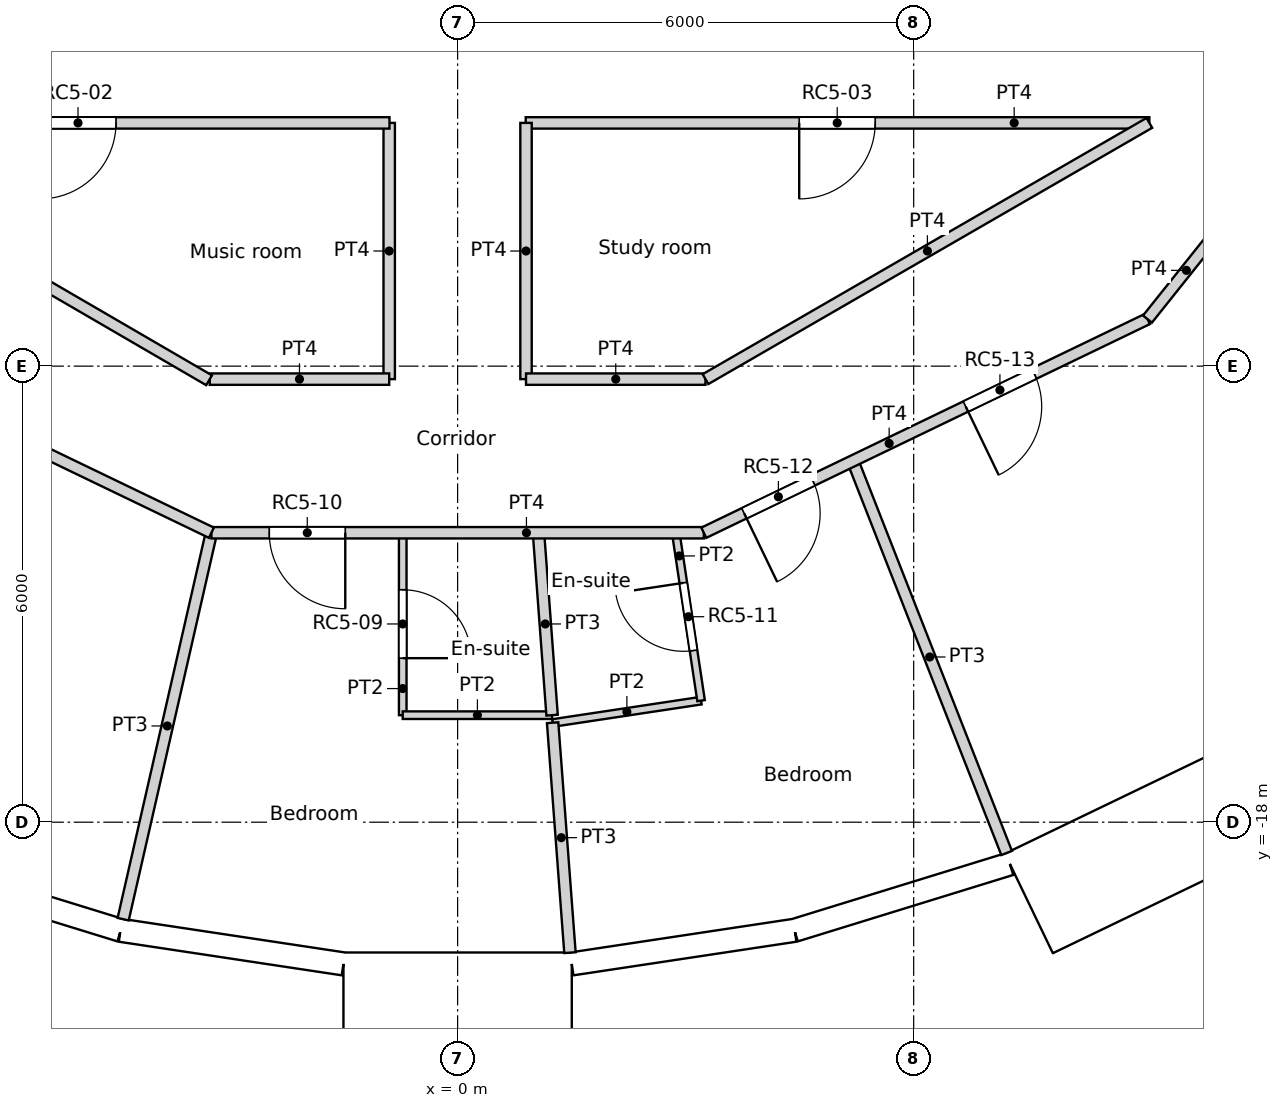
"""IFC4 building model, lengths in metres.
Left out: names, types, materials, properties, quantities, classifications, styles, units other than length and angle.
Written with IfcOpenShell. Run it as: python <this file> out.ifc"""

import sys

from ifc_helpers import new_model, si_unit, direction, frame, frame_2d, origin, origin_2d, place, context, subcontext, project, spatial, rectangle, circle, extrude, element, fill, save


model = new_model("IFC4")
c1 = context("Model", 3, precision=1e-05, world=origin(), true_north=direction((0.0, 1.0)))
c2 = subcontext(c1, "Body", "Model", "MODEL_VIEW")
j1 = project(units=[si_unit("LENGTHUNIT", "METRE"), si_unit("PLANEANGLEUNIT", "RADIAN")], contexts=[c1])
p1 = place(None, origin())
s1 = spatial("IfcSite", under=j1, at=p1, CompositionType="ELEMENT")
p2 = place(p1, origin())
s2 = spatial("IfcBuilding", under=s1, at=p2, CompositionType="ELEMENT")
p3 = place(p2, frame((0.0, 0.0, 270.6)))
s3 = spatial("IfcBuildingStorey", under=s2, at=p3, CompositionType="ELEMENT", Elevation=270.6)
for number, where, z_axis, x_axis in (
    (1, (-4.188, -18.35, 0.0), (0.0, 0.0, 1.0), (1.0, 0.0, 0.0)),
    (2, (1.406, -18.77, 0.0), (0.0, 0.0, 1.0), (1.0, 0.0, 0.0)),
    (3, (6.876, -17.521, 0.0), (0.0, 0.0, 1.0), (1.0, 0.0, 0.0)),
):
    element("IfcColumn", number, at=place(p3, frame(where, z_axis=z_axis, x_axis=x_axis)), inside=s3, PredefinedType="COLUMN", context=c2, shape_type="SweptSolid", body=[
        extrude(circle(Radius=0.55, at=origin_2d()), origin(), (0.0, 0.0, 1.0), 3.6),
    ])
p4 = place(p3, frame((-7.264, -18.549, 0.0), z_axis=(0.0, 0.0, 1.0), x_axis=(0.955555982805, -0.29480970765, 0.0)))
e4 = element("IfcWall", 4, at=p4, inside=s3, PredefinedType="SOLIDWALL", context=c2, shape_type="SweptSolid", body=[
    extrude(rectangle(XDim=2.962, YDim=0.3, at=frame_2d((1.481, 0.0))), origin(), (0.0, 0.0, 1.0), 3.25),
])
p5 = place(p4, frame((1.481, 0.0, 1.55)))
e5 = element("IfcOpeningElement", 5, at=p5, cuts=e4, PredefinedType="OPENING", context=c2, shape_type="SweptSolid", body=[
    extrude(circle(Radius=0.9, at=origin_2d()), frame((0.0, 0.16, 0.0), z_axis=(0.0, -1.0, 0.0), x_axis=(1.0, 0.0, 0.0)), (0.0, 0.0, 1.0), 0.32),
])
p6 = place(p3, frame((-4.433, -19.422, 0.0), z_axis=(0.0, 0.0, 1.0), x_axis=(0.988835775663, -0.149009425104, 0.0)))
e6 = element("IfcWall", 6, at=p6, inside=s3, PredefinedType="SOLIDWALL", context=c2, shape_type="SweptSolid", body=[
    extrude(rectangle(XDim=2.962, YDim=0.3, at=frame_2d((1.481, 0.0))), origin(), (0.0, 0.0, 1.0), 3.25),
])
p7 = place(p6, frame((1.481, 0.0, 1.55)))
e7 = element("IfcOpeningElement", 7, at=p7, cuts=e6, PredefinedType="OPENING", context=c2, shape_type="SweptSolid", body=[
    extrude(circle(Radius=0.9, at=origin_2d()), frame((0.0, 0.16, 0.0), z_axis=(0.0, -1.0, 0.0), x_axis=(1.0, 0.0, 0.0)), (0.0, 0.0, 1.0), 0.32),
])
p8 = place(p3, frame((-1.5, -20.441, -0.35), z_axis=(0.0, 0.0, 1.0), x_axis=(1.0, 0.0, 0.0)))
e8 = element("IfcWall", 8, at=p8, inside=s3, PredefinedType="ELEMENTEDWALL", context=c2, shape_type="SweptSolid", body=[
    extrude(rectangle(XDim=3.0, YDim=1.45, at=frame_2d((1.5, 0.0))), origin(), (0.0, 0.0, 1.0), 3.6),
])
p9 = place(p8, frame((1.5, 0.0, 1.9)))
e9 = element("IfcOpeningElement", 9, at=p9, cuts=e8, PredefinedType="OPENING", context=c2, shape_type="SweptSolid", body=[
    extrude(circle(Radius=0.9, at=origin_2d()), frame((0.0, 0.735, 0.0), z_axis=(0.0, -1.0, 0.0), x_axis=(1.0, 0.0, 0.0)), (0.0, 0.0, 1.0), 1.47),
])
p10 = place(p3, frame((1.504, -19.864, 0.0), z_axis=(0.0, 0.0, 1.0), x_axis=(0.988835775663, 0.149009425104, 0.0)))
e10 = element("IfcWall", 10, at=p10, inside=s3, PredefinedType="SOLIDWALL", context=c2, shape_type="SweptSolid", body=[
    extrude(rectangle(XDim=2.962, YDim=0.3, at=frame_2d((1.481, 0.0))), origin(), (0.0, 0.0, 1.0), 3.25),
])
p11 = place(p10, frame((1.481, 0.0, 1.55)))
e11 = element("IfcOpeningElement", 11, at=p11, cuts=e10, PredefinedType="OPENING", context=c2, shape_type="SweptSolid", body=[
    extrude(circle(Radius=0.9, at=origin_2d()), frame((0.0, 0.16, 0.0), z_axis=(0.0, -1.0, 0.0), x_axis=(1.0, 0.0, 0.0)), (0.0, 0.0, 1.0), 0.32),
])
p12 = place(p3, frame((4.433, -19.422, 0.0), z_axis=(0.0, 0.0, 1.0), x_axis=(0.955555982805, 0.29480970765, 0.0)))
e12 = element("IfcWall", 12, at=p12, inside=s3, PredefinedType="SOLIDWALL", context=c2, shape_type="SweptSolid", body=[
    extrude(rectangle(XDim=2.962, YDim=0.3, at=frame_2d((1.481, 0.0))), origin(), (0.0, 0.0, 1.0), 3.25),
])
p13 = place(p12, frame((1.481, 0.0, 1.55)))
e13 = element("IfcOpeningElement", 13, at=p13, cuts=e12, PredefinedType="OPENING", context=c2, shape_type="SweptSolid", body=[
    extrude(circle(Radius=0.9, at=origin_2d()), frame((0.0, 0.16, 0.0), z_axis=(0.0, -1.0, 0.0), x_axis=(1.0, 0.0, 0.0)), (0.0, 0.0, 1.0), 0.32),
])
p14 = place(p3, frame((7.518, -19.068, -0.35), z_axis=(0.0, 0.0, 1.0), x_axis=(0.900953362039, 0.433915935904, 0.0)))
e14 = element("IfcWall", 14, at=p14, inside=s3, PredefinedType="ELEMENTEDWALL", context=c2, shape_type="SweptSolid", body=[
    extrude(rectangle(XDim=3.0, YDim=1.45, at=frame_2d((1.5, 0.0))), origin(), (0.0, 0.0, 1.0), 3.6),
])
p15 = place(p14, frame((1.5, 0.0, 1.9)))
e15 = element("IfcOpeningElement", 15, at=p15, cuts=e14, PredefinedType="OPENING", context=c2, shape_type="SweptSolid", body=[
    extrude(circle(Radius=0.9, at=origin_2d()), frame((0.0, 0.735, 0.0), z_axis=(0.0, -1.0, 0.0), x_axis=(1.0, 0.0, 0.0)), (0.0, 0.0, 1.0), 1.47),
])
p16 = place(p3, frame((-9.092, -8.8, 0.0), z_axis=(0.0, 0.0, 1.0), x_axis=(1.0, 0.0, 0.0)))
e16 = element("IfcWall", 16, at=p16, inside=s3, PredefinedType="PARTITIONING", context=c2, shape_type="SweptSolid", body=[
    extrude(rectangle(XDim=8.196, YDim=0.15, at=frame_2d((4.098, 0.0))), origin(), (0.0, 0.0, 1.0), 3.1),
])
p17 = place(p16, frame((3.598, 0.0, 0.0)))
e17 = element("IfcOpeningElement", 17, at=p17, cuts=e16, PredefinedType="OPENING", context=c2, shape_type="SweptSolid", body=[
    extrude(rectangle(XDim=1.0, YDim=2.04, at=frame_2d((0.5, 1.02))), frame((0.0, 0.075, 0.0), z_axis=(0.0, -1.0, 0.0), x_axis=(1.0, 0.0, 0.0)), (0.0, 0.0, 1.0), 0.15),
])
p18 = place(p3, frame((-9.092, -8.8, 0.0), z_axis=(0.0, 0.0, 1.0), x_axis=(0.864470922103, -0.502682827277, 0.0)))
e18 = element("IfcWall", 18, at=p18, inside=s3, PredefinedType="PARTITIONING", context=c2, shape_type="SweptSolid", body=[
    extrude(rectangle(XDim=6.735, YDim=0.15, at=frame_2d((3.368, 0.0))), origin(), (0.0, 0.0, 1.0), 3.1),
])
p19 = place(p3, frame((0.896, -8.8, 0.0), z_axis=(0.0, 0.0, 1.0), x_axis=(1.0, 0.0, 0.0)))
e19 = element("IfcWall", 19, at=p19, inside=s3, PredefinedType="PARTITIONING", context=c2, shape_type="SweptSolid", body=[
    extrude(rectangle(XDim=8.205, YDim=0.15, at=frame_2d((4.102, 0.0))), origin(), (0.0, 0.0, 1.0), 3.1),
])
p20 = place(p19, frame((3.598, 0.0, 0.0)))
e20 = element("IfcOpeningElement", 20, at=p20, cuts=e19, PredefinedType="OPENING", context=c2, shape_type="SweptSolid", body=[
    extrude(rectangle(XDim=1.0, YDim=2.04, at=frame_2d((0.5, 1.02))), frame((0.0, 0.075, 0.0), z_axis=(0.0, -1.0, 0.0), x_axis=(1.0, 0.0, 0.0)), (0.0, 0.0, 1.0), 0.15),
])
p21 = place(p3, frame((-3.261, -12.171, 0.0), z_axis=(0.0, 0.0, 1.0), x_axis=(1.0, 0.0, 0.0)))
e21 = element("IfcWall", 21, at=p21, inside=s3, PredefinedType="PARTITIONING", context=c2, shape_type="SweptSolid", body=[
    extrude(rectangle(XDim=2.361, YDim=0.15, at=frame_2d((1.181, 0.0))), origin(), (0.0, 0.0, 1.0), 3.1),
])
for number, where, z_axis, x_axis in (
    (22, (-0.9, -12.171, 0.0), (0.0, 0.0, 1.0), (0.0, 1.0, 0.0)),
    (23, (0.9, -12.171, 0.0), (0.0, 0.0, 1.0), (0.0, 1.0, 0.0)),
):
    element("IfcWall", number, at=place(p3, frame(where, z_axis=z_axis, x_axis=x_axis)), inside=s3, PredefinedType="PARTITIONING", context=c2, shape_type="SweptSolid", body=[
        extrude(rectangle(XDim=3.371, YDim=0.15, at=frame_2d((1.686, 0.0))), origin(), (0.0, 0.0, 1.0), 3.1),
    ])
p22 = place(p3, frame((0.9, -12.171, 0.0), z_axis=(0.0, 0.0, 1.0), x_axis=(1.0, 0.0, 0.0)))
e24 = element("IfcWall", 24, at=p22, inside=s3, PredefinedType="PARTITIONING", context=c2, shape_type="SweptSolid", body=[
    extrude(rectangle(XDim=2.361, YDim=0.15, at=frame_2d((1.181, 0.0))), origin(), (0.0, 0.0, 1.0), 3.1),
])
p23 = place(p3, frame((3.261, -12.171, 0.0), z_axis=(0.0, 0.0, 1.0), x_axis=(0.866066809554, 0.499928276245, 0.0)))
e25 = element("IfcWall", 25, at=p23, inside=s3, PredefinedType="PARTITIONING", context=c2, shape_type="SweptSolid", body=[
    extrude(rectangle(XDim=6.743, YDim=0.15, at=frame_2d((3.371, 0.0))), origin(), (0.0, 0.0, 1.0), 3.1),
])
p24 = place(p3, frame((-9.076, -11.381, 0.0), z_axis=(0.0, 0.0, 1.0), x_axis=(0.900976027191, -0.433868872388, 0.0)))
e26 = element("IfcWall", 26, at=p24, inside=s3, PredefinedType="PARTITIONING", context=c2, shape_type="SweptSolid", body=[
    extrude(rectangle(XDim=6.479, YDim=0.15, at=frame_2d((3.239, 0.0))), origin(), (0.0, 0.0, 1.0), 3.1),
])
p25 = place(p24, frame((2.74, 0.0, 0.0)))
e27 = element("IfcOpeningElement", 27, at=p25, cuts=e26, PredefinedType="OPENING", context=c2, shape_type="SweptSolid", body=[
    extrude(rectangle(XDim=1.0, YDim=2.04, at=frame_2d((0.5, 1.02))), frame((0.0, 0.075, 0.0), z_axis=(0.0, -1.0, 0.0), x_axis=(1.0, 0.0, 0.0)), (0.0, 0.0, 1.0), 0.15),
])
p26 = place(p3, frame((-3.239, -14.192, 0.0), z_axis=(0.0, 0.0, 1.0), x_axis=(1.0, 0.0, 0.0)))
e28 = element("IfcWall", 28, at=p26, inside=s3, PredefinedType="PARTITIONING", context=c2, shape_type="SweptSolid", body=[
    extrude(rectangle(XDim=6.478, YDim=0.15, at=frame_2d((3.239, 0.0))), origin(), (0.0, 0.0, 1.0), 3.1),
])
p27 = place(p26, frame((0.761, 0.0, 0.0)))
e29 = element("IfcOpeningElement", 29, at=p27, cuts=e28, PredefinedType="OPENING", context=c2, shape_type="SweptSolid", body=[
    extrude(rectangle(XDim=1.0, YDim=2.1, at=frame_2d((0.5, 1.05))), frame((0.0, 0.075, 0.0), z_axis=(0.0, -1.0, 0.0), x_axis=(1.0, 0.0, 0.0)), (0.0, 0.0, 1.0), 0.15),
])
p28 = place(p3, frame((3.239, -14.192, 0.0), z_axis=(0.0, 0.0, 1.0), x_axis=(0.900851590682, 0.434127183629, 0.0)))
e30 = element("IfcWall", 30, at=p28, inside=s3, PredefinedType="PARTITIONING", context=c2, shape_type="SweptSolid", body=[
    extrude(rectangle(XDim=6.479, YDim=0.15, at=frame_2d((3.239, 0.0))), origin(), (0.0, 0.0, 1.0), 3.1),
])
p29 = place(p28, frame((0.589, 0.0, 0.0)))
e31 = element("IfcOpeningElement", 31, at=p29, cuts=e30, PredefinedType="OPENING", context=c2, shape_type="SweptSolid", body=[
    extrude(rectangle(XDim=1.0, YDim=2.1, at=frame_2d((0.5, 1.05))), frame((0.0, 0.075, 0.0), z_axis=(0.0, -1.0, 0.0), x_axis=(1.0, 0.0, 0.0)), (0.0, 0.0, 1.0), 0.15),
])
p30 = place(p28, frame((3.825, 0.0, 0.0)))
e32 = element("IfcOpeningElement", 32, at=p30, cuts=e30, PredefinedType="OPENING", context=c2, shape_type="SweptSolid", body=[
    extrude(rectangle(XDim=1.0, YDim=2.04, at=frame_2d((0.5, 1.02))), frame((0.0, 0.075, 0.0), z_axis=(0.0, -1.0, 0.0), x_axis=(1.0, 0.0, 0.0)), (0.0, 0.0, 1.0), 0.15),
])
p31 = place(p3, frame((9.076, -11.381, 0.0), z_axis=(0.0, 0.0, 1.0), x_axis=(0.623805208652, 0.781579849829, 0.0)))
e33 = element("IfcWall", 33, at=p31, inside=s3, PredefinedType="PARTITIONING", context=c2, shape_type="SweptSolid", body=[
    extrude(rectangle(XDim=1.64, YDim=0.15, at=frame_2d((0.82, 0.0))), origin(), (0.0, 0.0, 1.0), 3.1),
])
p32 = place(p3, frame((-4.4, -19.276, 0.0), z_axis=(0.0, 0.0, 1.0), x_axis=(0.222612505682, 0.974907007008, 0.0)))
e34 = element("IfcWall", 34, at=p32, inside=s3, PredefinedType="PARTITIONING", context=c2, shape_type="SweptSolid", body=[
    extrude(rectangle(XDim=5.215, YDim=0.15, at=frame_2d((2.607, 0.0))), origin(), (0.0, 0.0, 1.0), 3.1),
])
p33 = place(p3, frame((-0.722, -16.592, 0.0), z_axis=(0.0, 0.0, 1.0), x_axis=(0.0, 1.0, 0.0)))
e35 = element("IfcWall", 35, at=p33, inside=s3, PredefinedType="PARTITIONING", context=c2, shape_type="SweptSolid", body=[
    extrude(rectangle(XDim=2.4, YDim=0.1, at=frame_2d((1.2, 0.0))), origin(), (0.0, 0.0, 1.0), 3.1),
])
p34 = place(p33, frame((0.75, 0.0, 0.0)))
e36 = element("IfcOpeningElement", 36, at=p34, cuts=e35, PredefinedType="OPENING", context=c2, shape_type="SweptSolid", body=[
    extrude(rectangle(XDim=0.9, YDim=2.04, at=frame_2d((0.45, 1.02))), frame((0.0, 0.05, 0.0), z_axis=(0.0, -1.0, 0.0), x_axis=(1.0, 0.0, 0.0)), (0.0, 0.0, 1.0), 0.1),
])
p35 = place(p3, frame((-0.722, -16.592, 0.0), z_axis=(0.0, 0.0, 1.0), x_axis=(1.0, 0.0, 0.0)))
e37 = element("IfcWall", 37, at=p35, inside=s3, PredefinedType="PARTITIONING", context=c2, shape_type="SweptSolid", body=[
    extrude(rectangle(XDim=1.965, YDim=0.1, at=frame_2d((0.982, 0.0))), origin(), (0.0, 0.0, 1.0), 3.1),
])
p36 = place(p3, frame((1.25, -16.691, 0.0), z_axis=(0.0, 0.0, 1.0), x_axis=(0.075164061246, -0.99717118084, 0.0)))
e38 = element("IfcWall", 38, at=p36, inside=s3, PredefinedType="PARTITIONING", context=c2, shape_type="SweptSolid", body=[
    extrude(rectangle(XDim=3.034, YDim=0.15, at=frame_2d((1.517, 0.0))), origin(), (0.0, 0.0, 1.0), 3.1),
])
p37 = place(p3, frame((1.064, -14.192, 0.0), z_axis=(0.0, 0.0, 1.0), x_axis=(0.074353677934, -0.997231934195, 0.0)))
e39 = element("IfcWall", 39, at=p37, inside=s3, PredefinedType="PARTITIONING", context=c2, shape_type="SweptSolid", body=[
    extrude(rectangle(XDim=2.407, YDim=0.15, at=frame_2d((1.203, 0.0))), origin(), (0.0, 0.0, 1.0), 3.1),
])
p38 = place(p3, frame((1.251, -16.695, 0.0), z_axis=(0.0, 0.0, 1.0), x_axis=(0.988831780565, 0.149035934407, 0.0)))
e40 = element("IfcWall", 40, at=p38, inside=s3, PredefinedType="PARTITIONING", context=c2, shape_type="SweptSolid", body=[
    extrude(rectangle(XDim=1.974, YDim=0.1, at=frame_2d((0.987, 0.0))), origin(), (0.0, 0.0, 1.0), 3.1),
])
p39 = place(p3, frame((2.87, -14.192, 0.0), z_axis=(0.0, 0.0, 1.0), x_axis=(0.148960349288, -0.988843169739, 0.0)))
e41 = element("IfcWall", 41, at=p39, inside=s3, PredefinedType="PARTITIONING", context=c2, shape_type="SweptSolid", body=[
    extrude(rectangle(XDim=2.234, YDim=0.1, at=frame_2d((1.117, 0.0))), origin(), (0.0, 0.0, 1.0), 3.1),
])
p40 = place(p39, frame((0.667, 0.0, 0.0)))
e42 = element("IfcOpeningElement", 42, at=p40, cuts=e41, PredefinedType="OPENING", context=c2, shape_type="SweptSolid", body=[
    extrude(rectangle(XDim=0.9, YDim=2.04, at=frame_2d((0.45, 1.02))), frame((0.0, 0.05, 0.0), z_axis=(0.0, -1.0, 0.0), x_axis=(1.0, 0.0, 0.0)), (0.0, 0.0, 1.0), 0.1),
])
p41 = place(p3, frame((5.199, -13.248, 0.0), z_axis=(0.0, 0.0, 1.0), x_axis=(0.365334662456, -0.930876245485, 0.0)))
e43 = element("IfcWall", 43, at=p41, inside=s3, PredefinedType="PARTITIONING", context=c2, shape_type="SweptSolid", body=[
    extrude(rectangle(XDim=5.54, YDim=0.15, at=frame_2d((2.77, 0.0))), origin(), (0.0, 0.0, 1.0), 3.1),
])
p42 = place(p5, origin())
e44 = element("IfcWindow", 44, at=p42, inside=s3, PartitioningType="SINGLE_PANEL", PredefinedType="WINDOW", context=c2, shape_type="SweptSolid", body=[
    extrude(circle(Radius=0.9, at=origin_2d()), frame((0.0, 0.12, 0.0), z_axis=(0.0, -1.0, 0.0), x_axis=(1.0, 0.0, 0.0)), (0.0, 0.0, 1.0), 0.1),
])
fill(e5, e44)
p43 = place(p7, origin())
e45 = element("IfcWindow", 45, at=p43, inside=s3, PartitioningType="SINGLE_PANEL", PredefinedType="WINDOW", context=c2, shape_type="SweptSolid", body=[
    extrude(circle(Radius=0.9, at=origin_2d()), frame((0.0, 0.12, 0.0), z_axis=(0.0, -1.0, 0.0), x_axis=(1.0, 0.0, 0.0)), (0.0, 0.0, 1.0), 0.1),
])
fill(e7, e45)
p44 = place(p9, origin())
e46 = element("IfcWindow", 46, at=p44, inside=s3, PartitioningType="SINGLE_PANEL", PredefinedType="WINDOW", context=c2, shape_type="SweptSolid", body=[
    extrude(circle(Radius=0.9, at=origin_2d()), frame((0.0, 0.695, 0.0), z_axis=(0.0, -1.0, 0.0), x_axis=(1.0, 0.0, 0.0)), (0.0, 0.0, 1.0), 0.1),
])
fill(e9, e46)
p45 = place(p11, origin())
e47 = element("IfcWindow", 47, at=p45, inside=s3, PartitioningType="SINGLE_PANEL", PredefinedType="WINDOW", context=c2, shape_type="SweptSolid", body=[
    extrude(circle(Radius=0.9, at=origin_2d()), frame((0.0, 0.12, 0.0), z_axis=(0.0, -1.0, 0.0), x_axis=(1.0, 0.0, 0.0)), (0.0, 0.0, 1.0), 0.1),
])
fill(e11, e47)
p46 = place(p13, origin())
e48 = element("IfcWindow", 48, at=p46, inside=s3, PartitioningType="SINGLE_PANEL", PredefinedType="WINDOW", context=c2, shape_type="SweptSolid", body=[
    extrude(circle(Radius=0.9, at=origin_2d()), frame((0.0, 0.12, 0.0), z_axis=(0.0, -1.0, 0.0), x_axis=(1.0, 0.0, 0.0)), (0.0, 0.0, 1.0), 0.1),
])
fill(e13, e48)
p47 = place(p15, origin())
e49 = element("IfcWindow", 49, at=p47, inside=s3, PartitioningType="SINGLE_PANEL", PredefinedType="WINDOW", context=c2, shape_type="SweptSolid", body=[
    extrude(circle(Radius=0.9, at=origin_2d()), frame((0.0, 0.695, 0.0), z_axis=(0.0, -1.0, 0.0), x_axis=(1.0, 0.0, 0.0)), (0.0, 0.0, 1.0), 0.1),
])
fill(e15, e49)
p48 = place(p17, origin())
e50 = element("IfcDoor", 50, at=p48, inside=s3, OperationType="SINGLE_SWING_RIGHT", PredefinedType="DOOR", context=c2, shape_type="SweptSolid", body=[
    extrude(rectangle(XDim=1.0, YDim=2.04, at=frame_2d((0.5, 1.02))), frame((0.0, 0.025, 0.0), z_axis=(0.0, -1.0, 0.0), x_axis=(1.0, 0.0, 0.0)), (0.0, 0.0, 1.0), 0.05),
])
fill(e17, e50)
p49 = place(p20, origin())
e51 = element("IfcDoor", 51, at=p49, inside=s3, OperationType="SINGLE_SWING_RIGHT", PredefinedType="DOOR", context=c2, shape_type="SweptSolid", body=[
    extrude(rectangle(XDim=1.0, YDim=2.04, at=frame_2d((0.5, 1.02))), frame((0.0, 0.025, 0.0), z_axis=(0.0, -1.0, 0.0), x_axis=(1.0, 0.0, 0.0)), (0.0, 0.0, 1.0), 0.05),
])
fill(e20, e51)
p50 = place(p34, origin())
e52 = element("IfcDoor", 52, at=p50, inside=s3, OperationType="SINGLE_SWING_RIGHT", PredefinedType="DOOR", context=c2, shape_type="SweptSolid", body=[
    extrude(rectangle(XDim=0.9, YDim=2.04, at=frame_2d((0.45, 1.02))), frame((0.0, 0.025, 0.0), z_axis=(0.0, -1.0, 0.0), x_axis=(1.0, 0.0, 0.0)), (0.0, 0.0, 1.0), 0.05),
])
fill(e36, e52)
p51 = place(p27, origin())
e53 = element("IfcDoor", 53, at=p51, inside=s3, OperationType="SINGLE_SWING_LEFT", PredefinedType="DOOR", context=c2, shape_type="SweptSolid", body=[
    extrude(rectangle(XDim=1.0, YDim=2.1, at=frame_2d((0.5, 1.05))), frame((0.0, 0.025, 0.0), z_axis=(0.0, -1.0, 0.0), x_axis=(1.0, 0.0, 0.0)), (0.0, 0.0, 1.0), 0.05),
])
fill(e29, e53)
p52 = place(p40, origin())
e54 = element("IfcDoor", 54, at=p52, inside=s3, OperationType="SINGLE_SWING_RIGHT", PredefinedType="DOOR", context=c2, shape_type="SweptSolid", body=[
    extrude(rectangle(XDim=0.9, YDim=2.04, at=frame_2d((0.45, 1.02))), frame((0.0, 0.025, 0.0), z_axis=(0.0, -1.0, 0.0), x_axis=(1.0, 0.0, 0.0)), (0.0, 0.0, 1.0), 0.05),
])
fill(e42, e54)
p53 = place(p29, origin())
e55 = element("IfcDoor", 55, at=p53, inside=s3, OperationType="SINGLE_SWING_RIGHT", PredefinedType="DOOR", context=c2, shape_type="SweptSolid", body=[
    extrude(rectangle(XDim=1.0, YDim=2.1, at=frame_2d((0.5, 1.05))), frame((0.0, 0.025, 0.0), z_axis=(0.0, -1.0, 0.0), x_axis=(1.0, 0.0, 0.0)), (0.0, 0.0, 1.0), 0.05),
])
fill(e31, e55)
p54 = place(p30, origin())
e56 = element("IfcDoor", 56, at=p54, inside=s3, OperationType="SINGLE_SWING_RIGHT", PredefinedType="DOOR", context=c2, shape_type="SweptSolid", body=[
    extrude(rectangle(XDim=1.0, YDim=2.04, at=frame_2d((0.5, 1.02))), frame((0.0, 0.025, 0.0), z_axis=(0.0, -1.0, 0.0), x_axis=(1.0, 0.0, 0.0)), (0.0, 0.0, 1.0), 0.05),
])
fill(e32, e56)
save(model, sys.argv[1])
